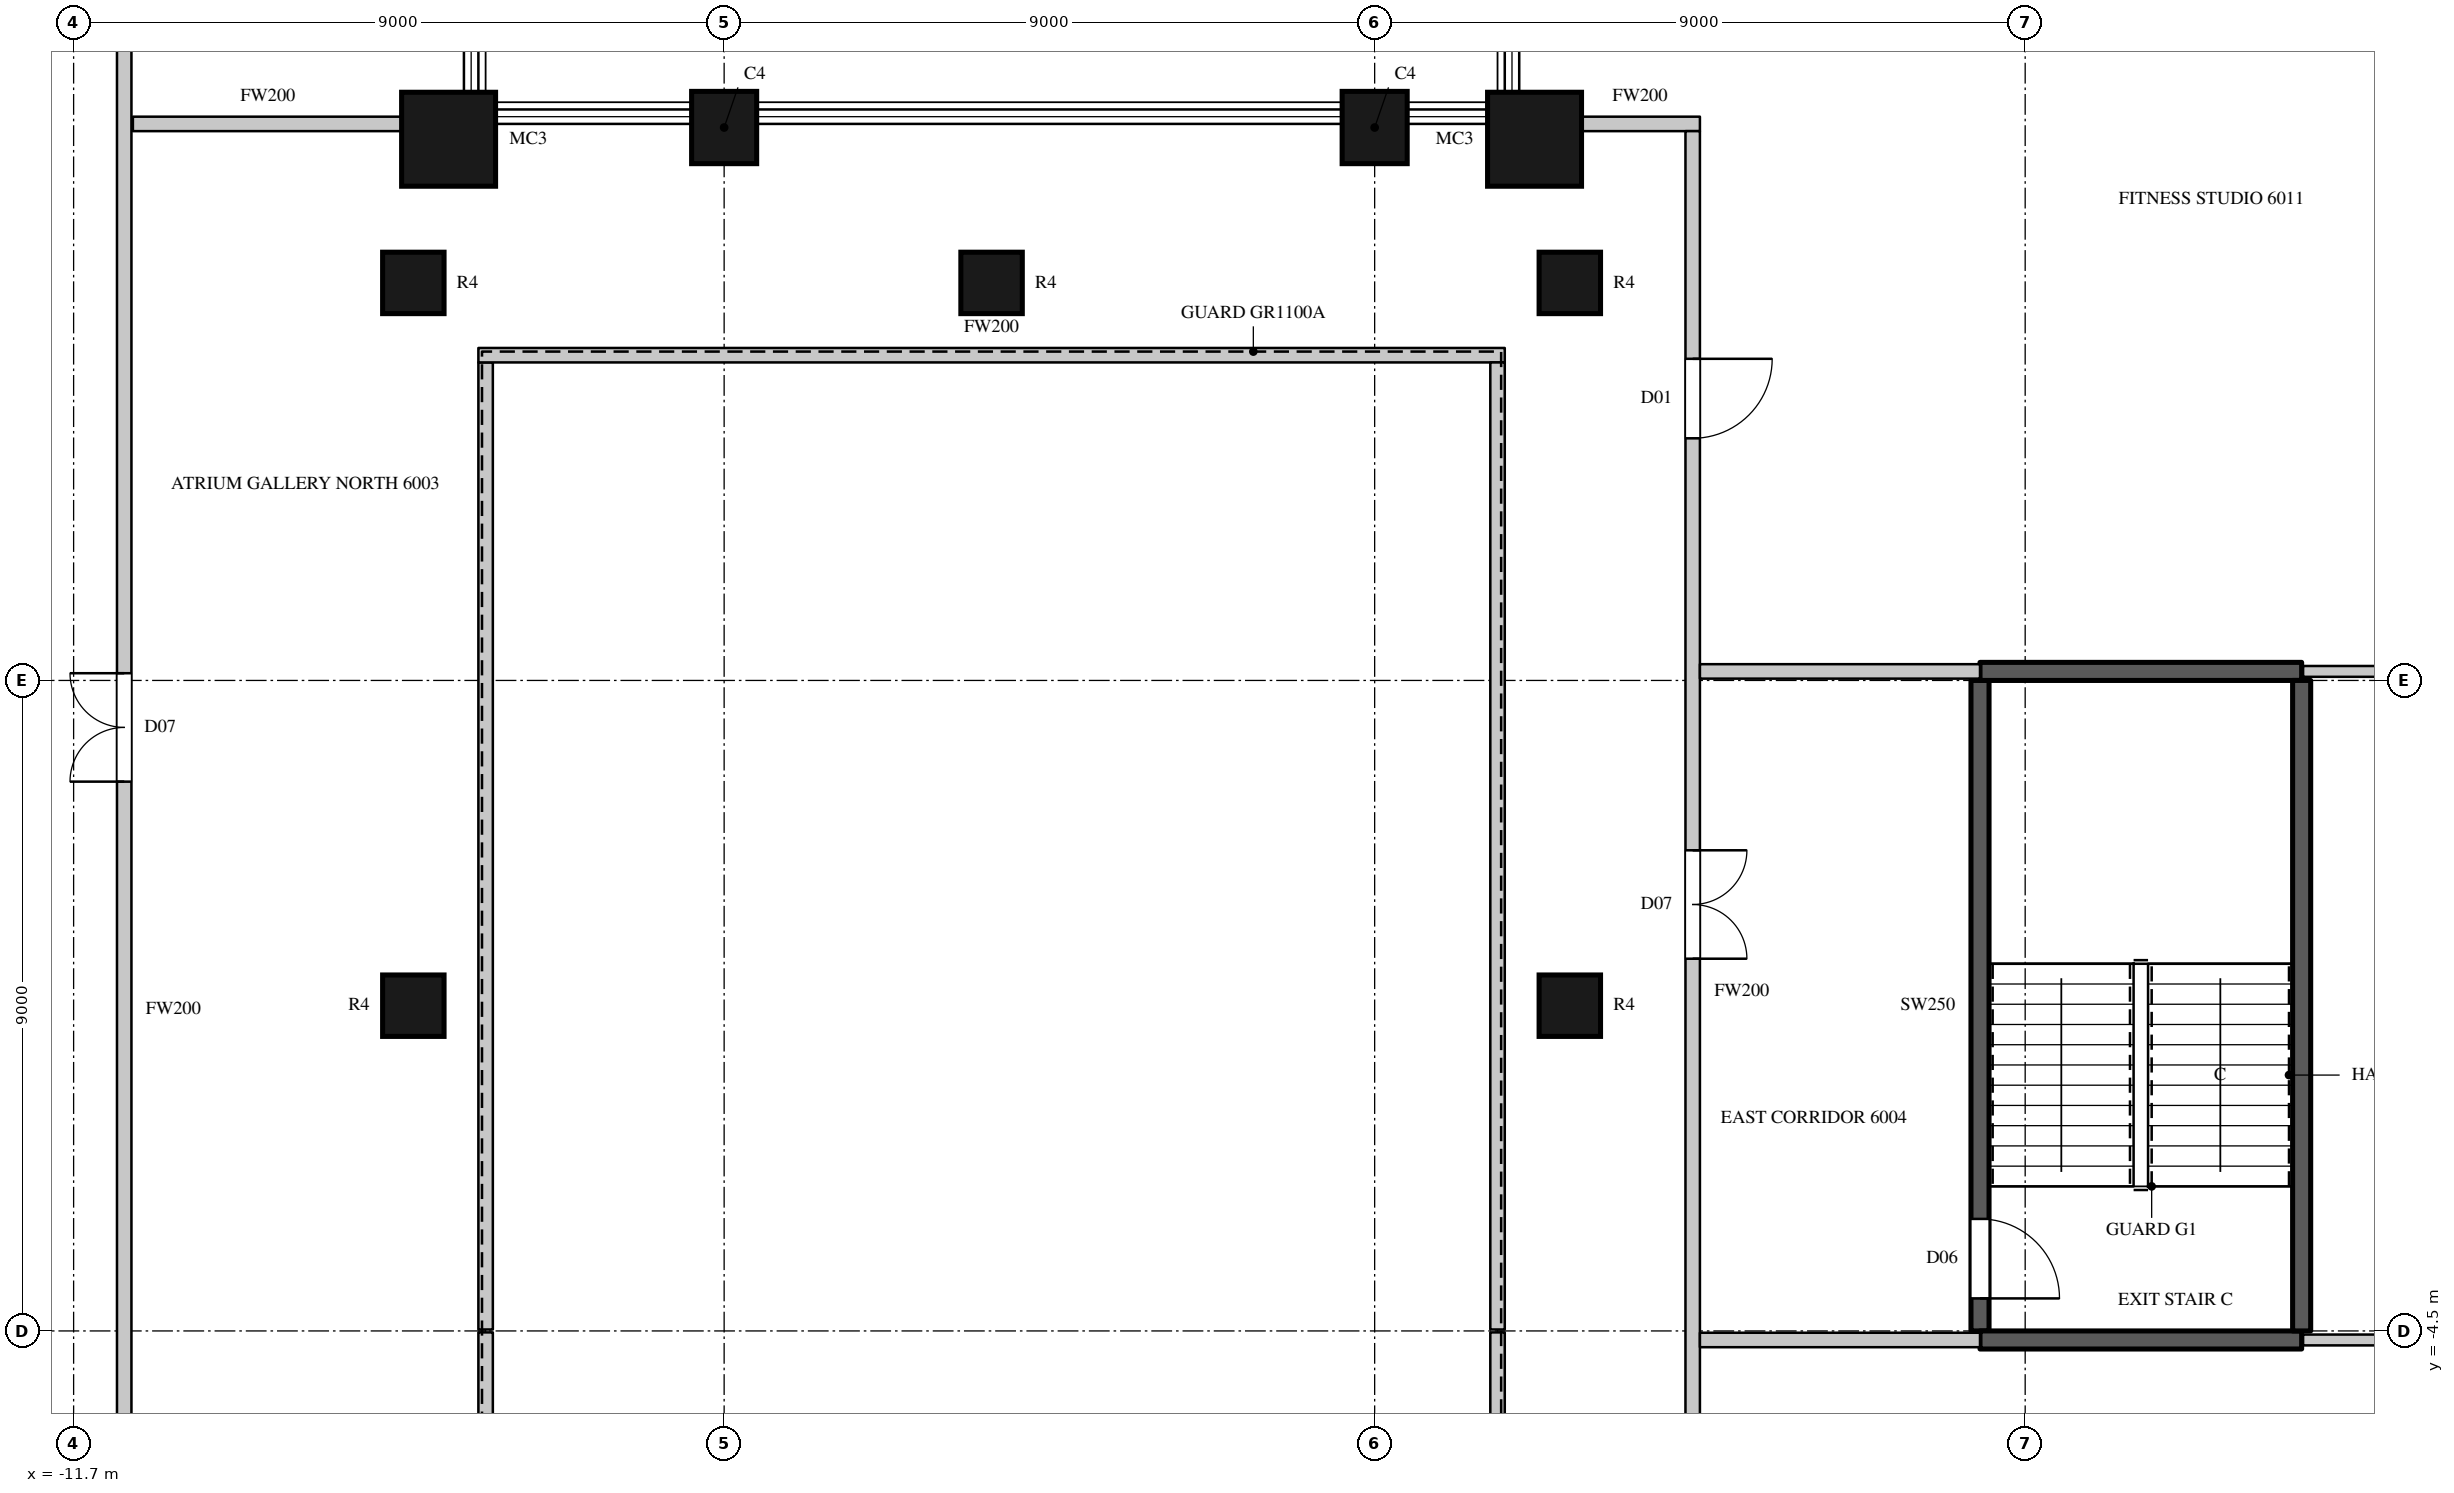
"""IFC4 building model, lengths in metres.
Left out: names, types, materials, properties, quantities, classifications, styles, units other than length and angle.
Written with IfcOpenShell. Run it as: python <this file> out.ifc"""

import sys

from ifc_helpers import new_model, si_unit, direction, frame, frame_2d, origin, origin_2d, place, context, subcontext, project, spatial, rectangle, circle, extrude, element, fill, save


model = new_model("IFC4")
c1 = context("Model", 3, precision=1e-05, world=origin(), true_north=direction((0.0, 1.0)))
c2 = subcontext(c1, "Body", "Model", "MODEL_VIEW")
j1 = project(units=[si_unit("LENGTHUNIT", "METRE"), si_unit("PLANEANGLEUNIT", "RADIAN")], contexts=[c1])
p1 = place(None, origin())
s1 = spatial("IfcSite", under=j1, at=p1, CompositionType="ELEMENT")
p2 = place(p1, origin())
s2 = spatial("IfcBuilding", under=s1, at=p2, CompositionType="ELEMENT")
p3 = place(p2, frame((0.0, 0.0, 268.0)))
s3 = spatial("IfcBuildingStorey", under=s2, at=p3, CompositionType="ELEMENT", Elevation=268.0)
p4 = place(p3, frame((8.512, 11.988, 0.0), z_axis=(0.0, 0.0, 1.0), x_axis=(1.0, 0.0, 0.0)))
e1 = element("IfcColumn", 1, at=p4, inside=s3, PredefinedType="COLUMN", context=c2, shape_type="SweptSolid", body=[
    extrude(circle(Radius=0.65, at=origin_2d()), origin(), (0.0, 0.0, 1.0), 4.1),
])
for number, where, z_axis, x_axis in (
    (2, (6.3, 12.15, 0.0), (0.0, 0.0, 1.0), (-1.0, 0.0, 0.0)),
    (3, (-2.7, 12.15, 0.0), (0.0, 0.0, 1.0), (-1.0, 0.0, 0.0)),
):
    element("IfcColumn", number, at=place(p3, frame(where, z_axis=z_axis, x_axis=x_axis)), inside=s3, PredefinedType="COLUMN", context=c2, shape_type="SweptSolid", body=[
        extrude(rectangle(XDim=0.9, YDim=1.0, at=origin_2d()), origin(), (0.0, 0.0, 1.0), 4.1),
    ])
p5 = place(p3, frame((-6.512, 11.988, 0.0), z_axis=(0.0, 0.0, 1.0), x_axis=(1.0, 0.0, 0.0)))
e4 = element("IfcColumn", 4, at=p5, inside=s3, PredefinedType="COLUMN", context=c2, shape_type="SweptSolid", body=[
    extrude(circle(Radius=0.65, at=origin_2d()), origin(), (0.0, 0.0, 1.0), 4.1),
])
for number, where, z_axis, x_axis in (
    (5, (-7.0, 0.0, 0.0), (0.0, 0.0, 1.0), (1.0, 0.0, 0.0)),
    (6, (-7.0, 10.0, 0.0), (0.0, 0.0, 1.0), (1.0, 0.0, 0.0)),
    (7, (1.0, 10.0, 0.0), (0.0, 0.0, 1.0), (1.0, 0.0, 0.0)),
    (8, (9.0, 0.0, 0.0), (0.0, 0.0, 1.0), (1.0, 0.0, 0.0)),
    (9, (9.0, 10.0, 0.0), (0.0, 0.0, 1.0), (1.0, 0.0, 0.0)),
):
    element("IfcColumn", number, at=place(p3, frame(where, z_axis=z_axis, x_axis=x_axis)), inside=s3, PredefinedType="COLUMN", context=c2, shape_type="SweptSolid", body=[
        extrude(circle(Radius=0.425, at=origin_2d()), origin(), (0.0, 0.0, 1.0), 4.1),
    ])
p6 = place(p3, frame((-11.0, -14.8, 0.0), z_axis=(0.0, 0.0, 1.0), x_axis=(0.0, 1.0, 0.0)))
e10 = element("IfcWall", 10, at=p6, inside=s3, PredefinedType="PARTITIONING", context=c2, shape_type="SweptSolid", body=[
    extrude(rectangle(XDim=29.5, YDim=0.2, at=frame_2d((14.75, 0.0))), origin(), (0.0, 0.0, 1.0), 3.8),
])
p7 = place(p6, frame((17.9, 0.0, 0.0)))
e11 = element("IfcOpeningElement", 11, at=p7, cuts=e10, PredefinedType="OPENING", context=c2, shape_type="SweptSolid", body=[
    extrude(rectangle(XDim=1.5, YDim=2.4, at=frame_2d((0.75, 1.2))), frame((0.0, 0.11, 0.0), z_axis=(0.0, -1.0, 0.0), x_axis=(1.0, 0.0, 0.0)), (0.0, 0.0, 1.0), 0.22),
])
p8 = place(p3, frame((-10.88, 12.2, 0.0), z_axis=(0.0, 0.0, 1.0), x_axis=(1.0, 0.0, 0.0)))
e12 = element("IfcWall", 12, at=p8, inside=s3, PredefinedType="PARTITIONING", context=c2, shape_type="SweptSolid", body=[
    extrude(rectangle(XDim=3.736, YDim=0.2, at=frame_2d((1.868, 0.0))), origin(), (0.0, 0.0, 1.0), 3.8),
])
p9 = place(p3, frame((-6.0, -8.9, 0.0), z_axis=(0.0, 0.0, 1.0), x_axis=(0.0, 1.0, 0.0)))
e13 = element("IfcWall", 13, at=p9, inside=s3, PredefinedType="PARTITIONING", context=c2, shape_type="SweptSolid", body=[
    extrude(rectangle(XDim=4.38, YDim=0.2, at=frame_2d((2.19, 0.0))), origin(), (0.0, 0.0, 1.0), 3.8),
])
p10 = place(p3, frame((-6.0, -4.48, 0.0), z_axis=(0.0, 0.0, 1.0), x_axis=(0.0, 1.0, 0.0)))
e14 = element("IfcWall", 14, at=p10, inside=s3, PredefinedType="PARTITIONING", context=c2, shape_type="SweptSolid", body=[
    extrude(rectangle(XDim=13.38, YDim=0.2, at=frame_2d((6.69, 0.0))), origin(), (0.0, 0.0, 1.0), 3.8),
])
p11 = place(p3, frame((-6.1, 9.0, 0.0), z_axis=(0.0, 0.0, 1.0), x_axis=(1.0, 0.0, 0.0)))
e15 = element("IfcWall", 15, at=p11, inside=s3, PredefinedType="PARTITIONING", context=c2, shape_type="SweptSolid", body=[
    extrude(rectangle(XDim=14.2, YDim=0.2, at=frame_2d((7.1, 0.0))), origin(), (0.0, 0.0, 1.0), 3.8),
])
p12 = place(p3, frame((8.0, -8.9, 0.0), z_axis=(0.0, 0.0, 1.0), x_axis=(0.0, 1.0, 0.0)))
e16 = element("IfcWall", 16, at=p12, inside=s3, PredefinedType="PARTITIONING", context=c2, shape_type="SweptSolid", body=[
    extrude(rectangle(XDim=4.38, YDim=0.2, at=frame_2d((2.19, 0.0))), origin(), (0.0, 0.0, 1.0), 3.8),
])
p13 = place(p3, frame((8.0, -4.48, 0.0), z_axis=(0.0, 0.0, 1.0), x_axis=(0.0, 1.0, 0.0)))
e17 = element("IfcWall", 17, at=p13, inside=s3, PredefinedType="PARTITIONING", context=c2, shape_type="SweptSolid", body=[
    extrude(rectangle(XDim=13.38, YDim=0.2, at=frame_2d((6.69, 0.0))), origin(), (0.0, 0.0, 1.0), 3.8),
])
p14 = place(p3, frame((9.144, 12.2, 0.0), z_axis=(0.0, 0.0, 1.0), x_axis=(1.0, 0.0, 0.0)))
e18 = element("IfcWall", 18, at=p14, inside=s3, PredefinedType="PARTITIONING", context=c2, shape_type="SweptSolid", body=[
    extrude(rectangle(XDim=1.656, YDim=0.2, at=frame_2d((0.828, 0.0))), origin(), (0.0, 0.0, 1.0), 3.8),
])
p15 = place(p3, frame((10.7, -11.7, 0.0), z_axis=(0.0, 0.0, 1.0), x_axis=(0.0, 1.0, 0.0)))
e19 = element("IfcWall", 19, at=p15, inside=s3, PredefinedType="PARTITIONING", context=c2, shape_type="SweptSolid", body=[
    extrude(rectangle(XDim=23.8, YDim=0.2, at=frame_2d((11.9, 0.0))), origin(), (0.0, 0.0, 1.0), 3.8),
])
p16 = place(p15, frame((12.35, 0.0, 0.0)))
e20 = element("IfcOpeningElement", 20, at=p16, cuts=e19, PredefinedType="OPENING", context=c2, shape_type="SweptSolid", body=[
    extrude(rectangle(XDim=1.5, YDim=2.4, at=frame_2d((0.75, 1.2))), frame((0.0, 0.11, 0.0), z_axis=(0.0, -1.0, 0.0), x_axis=(1.0, 0.0, 0.0)), (0.0, 0.0, 1.0), 0.22),
])
p17 = place(p15, frame((19.55, 0.0, 0.0)))
e21 = element("IfcOpeningElement", 21, at=p17, cuts=e19, PredefinedType="OPENING", context=c2, shape_type="SweptSolid", body=[
    extrude(rectangle(XDim=1.1, YDim=2.4, at=frame_2d((0.55, 1.2))), frame((0.0, 0.11, 0.0), z_axis=(0.0, -1.0, 0.0), x_axis=(1.0, 0.0, 0.0)), (0.0, 0.0, 1.0), 0.22),
])
p18 = place(p15, frame((4.25, 0.0, 0.0)))
e22 = element("IfcOpeningElement", 22, at=p18, cuts=e19, PredefinedType="OPENING", context=c2, shape_type="SweptSolid", body=[
    extrude(rectangle(XDim=1.1, YDim=2.4, at=frame_2d((0.55, 1.2))), frame((0.0, 0.11, 0.0), z_axis=(0.0, -1.0, 0.0), x_axis=(1.0, 0.0, 0.0)), (0.0, 0.0, 1.0), 0.22),
])
for number, where, z_axis, x_axis in (
    (23, (10.8, -4.625, 0.0), (0.0, 0.0, 1.0), (1.0, 0.0, 0.0)),
    (24, (10.8, 4.625, 0.0), (0.0, 0.0, 1.0), (1.0, 0.0, 0.0)),
):
    element("IfcWall", number, at=place(p3, frame(where, z_axis=z_axis, x_axis=x_axis)), inside=s3, PredefinedType="PARTITIONING", context=c2, shape_type="SweptSolid", body=[
        extrude(rectangle(XDim=3.875, YDim=0.2, at=frame_2d((1.938, 0.0))), origin(), (0.0, 0.0, 1.0), 3.8),
    ])
for number, where, z_axis, x_axis in (
    (25, (19.145, -4.625, 0.0), (0.0, 0.0, 1.0), (1.0, 0.0, 0.0)),
    (26, (19.145, 4.625, 0.0), (0.0, 0.0, 1.0), (1.0, 0.0, 0.0)),
):
    element("IfcWall", number, at=place(p3, frame(where, z_axis=z_axis, x_axis=x_axis)), inside=s3, PredefinedType="PARTITIONING", context=c2, shape_type="SweptSolid", body=[
        extrude(rectangle(XDim=4.605, YDim=0.15, at=frame_2d((2.302, 0.0))), origin(), (0.0, 0.0, 1.0), 3.8),
    ])
p19 = place(p3, frame((14.675, -4.5, 0.0), z_axis=(0.0, 0.0, 1.0), x_axis=(0.0, 1.0, 0.0)))
e27 = element("IfcWall", 27, at=p19, inside=s3, PredefinedType="SHEAR", context=c2, shape_type="SweptSolid", body=[
    extrude(rectangle(XDim=9.0, YDim=0.25, at=frame_2d((4.5, 0.0))), origin(), (0.0, 0.0, 1.0), 3.8),
])
p20 = place(p19, frame((0.45, 0.0, 0.0)))
e28 = element("IfcOpeningElement", 28, at=p20, cuts=e27, PredefinedType="OPENING", context=c2, shape_type="SweptSolid", body=[
    extrude(rectangle(XDim=1.1, YDim=2.2, at=frame_2d((0.55, 1.1))), frame((0.0, 0.135, 0.0), z_axis=(0.0, -1.0, 0.0), x_axis=(1.0, 0.0, 0.0)), (0.0, 0.0, 1.0), 0.27),
])
for number, where, z_axis, x_axis in (
    (29, (14.675, -4.625, 0.0), (0.0, 0.0, 1.0), (1.0, 0.0, 0.0)),
    (30, (14.675, 4.625, 0.0), (0.0, 0.0, 1.0), (1.0, 0.0, 0.0)),
):
    element("IfcWall", number, at=place(p3, frame(where, z_axis=z_axis, x_axis=x_axis)), inside=s3, PredefinedType="SHEAR", context=c2, shape_type="SweptSolid", body=[
        extrude(rectangle(XDim=4.45, YDim=0.25, at=frame_2d((2.225, 0.0))), origin(), (0.0, 0.0, 1.0), 3.8),
    ])
p21 = place(p3, frame((19.125, -4.5, 0.0), z_axis=(0.0, 0.0, 1.0), x_axis=(0.0, 1.0, 0.0)))
e31 = element("IfcWall", 31, at=p21, inside=s3, PredefinedType="SHEAR", context=c2, shape_type="SweptSolid", body=[
    extrude(rectangle(XDim=9.0, YDim=0.25, at=frame_2d((4.5, 0.0))), origin(), (0.0, 0.0, 1.0), 3.8),
])
p22 = place(p7, origin())
e32 = element("IfcDoor", 32, at=p22, inside=s3, OperationType="DOUBLE_DOOR_SINGLE_SWING", PredefinedType="DOOR", context=c2, shape_type="SweptSolid", body=[
    extrude(rectangle(XDim=1.5, YDim=2.4, at=frame_2d((0.75, 1.2))), frame((0.0, 0.025, 0.0), z_axis=(0.0, -1.0, 0.0), x_axis=(1.0, 0.0, 0.0)), (0.0, 0.0, 1.0), 0.05),
])
fill(e11, e32)
p23 = place(p16, origin())
e33 = element("IfcDoor", 33, at=p23, inside=s3, OperationType="DOUBLE_DOOR_SINGLE_SWING", PredefinedType="DOOR", context=c2, shape_type="SweptSolid", body=[
    extrude(rectangle(XDim=1.5, YDim=2.4, at=frame_2d((0.75, 1.2))), frame((0.0, 0.025, 0.0), z_axis=(0.0, -1.0, 0.0), x_axis=(1.0, 0.0, 0.0)), (0.0, 0.0, 1.0), 0.05),
])
fill(e20, e33)
p24 = place(p17, origin())
e34 = element("IfcDoor", 34, at=p24, inside=s3, OperationType="SINGLE_SWING_LEFT", PredefinedType="DOOR", context=c2, shape_type="SweptSolid", body=[
    extrude(rectangle(XDim=1.1, YDim=2.4, at=frame_2d((0.55, 1.2))), frame((0.0, 0.025, 0.0), z_axis=(0.0, -1.0, 0.0), x_axis=(1.0, 0.0, 0.0)), (0.0, 0.0, 1.0), 0.05),
])
fill(e21, e34)
p25 = place(p20, origin())
e35 = element("IfcDoor", 35, at=p25, inside=s3, OperationType="SINGLE_SWING_RIGHT", PredefinedType="DOOR", context=c2, shape_type="SweptSolid", body=[
    extrude(rectangle(XDim=1.1, YDim=2.2, at=frame_2d((0.55, 1.1))), frame((0.0, 0.025, 0.0), z_axis=(0.0, -1.0, 0.0), x_axis=(1.0, 0.0, 0.0)), (0.0, 0.0, 1.0), 0.05),
])
fill(e28, e35)
save(model, sys.argv[1])
